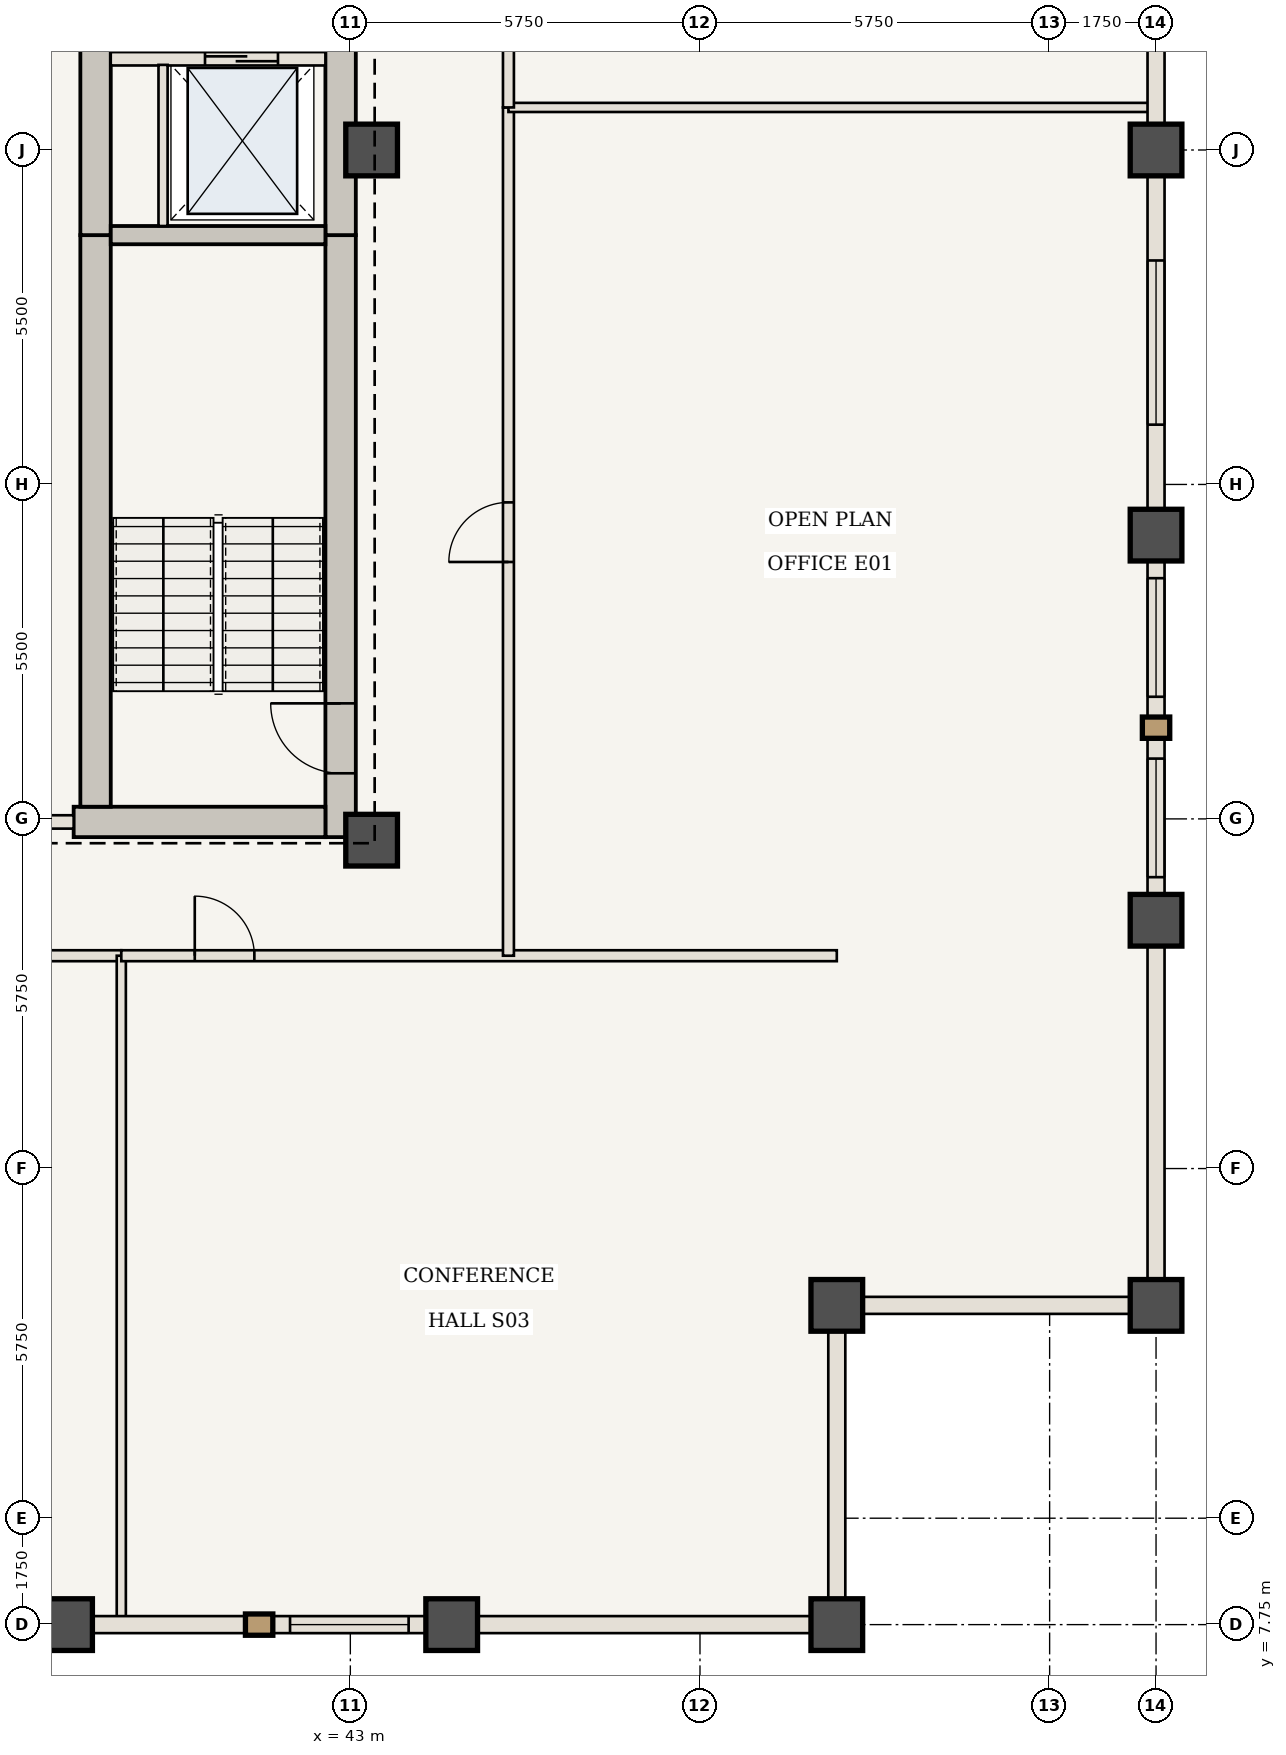
"""IFC4 building model, lengths in metres.
Left out: names, types, materials, properties, quantities, classifications, styles, units other than length and angle.
Written with IfcOpenShell. Run it as: python <this file> out.ifc"""

import sys

from ifc_helpers import new_model, si_unit, direction, frame, frame_2d, origin, origin_2d, place, context, subcontext, project, spatial, rectangle, extrude, element, fill, save


model = new_model("IFC4")
c1 = context("Model", 3, precision=1e-05, world=origin(), true_north=direction((0.0, 1.0)))
c2 = subcontext(c1, "Body", "Model", "MODEL_VIEW")
j1 = project(units=[si_unit("LENGTHUNIT", "METRE"), si_unit("PLANEANGLEUNIT", "RADIAN")], contexts=[c1])
p1 = place(None, origin())
s1 = spatial("IfcSite", under=j1, at=p1, CompositionType="ELEMENT")
p2 = place(p1, origin())
s2 = spatial("IfcBuilding", under=s1, at=p2, CompositionType="ELEMENT")
p3 = place(p2, frame((0.0, 0.0, 233.1)))
s3 = spatial("IfcBuildingStorey", under=s2, at=p3, CompositionType="ELEMENT", Elevation=233.1)
p4 = place(p3, frame((42.84, 20.7, 0.0), z_axis=(0.0, 0.0, 1.0), x_axis=(0.0, 1.0, 0.0)))
e1 = element("IfcWall", 1, at=p4, inside=s3, PredefinedType="SHEAR", context=c2, shape_type="SweptSolid", body=[
    extrude(rectangle(XDim=9.9, YDim=0.5, at=frame_2d((4.95, 0.0))), origin(), (0.0, 0.0, 1.0), 3.85),
])
p5 = place(p4, frame((1.05, 0.0, 0.0)))
e2 = element("IfcOpeningElement", 2, at=p5, cuts=e1, PredefinedType="OPENING", context=c2, shape_type="SweptSolid", body=[
    extrude(rectangle(XDim=1.15, YDim=2.15, at=frame_2d((0.575, 1.075))), frame((0.0, 0.26, 0.0), z_axis=(0.0, -1.0, 0.0), x_axis=(1.0, 0.0, 0.0)), (0.0, 0.0, 1.0), 0.52),
])
p6 = place(p3, frame((42.84, 30.6, 0.0), z_axis=(0.0, 0.0, 1.0), x_axis=(0.0, 1.0, 0.0)))
e3 = element("IfcWall", 3, at=p6, inside=s3, PredefinedType="SHEAR", context=c2, shape_type="SweptSolid", body=[
    extrude(rectangle(XDim=12.65, YDim=0.5, at=frame_2d((6.325, 0.0))), origin(), (0.0, 0.0, 1.0), 3.85),
])
p7 = place(p6, frame((4.2, 0.0, 0.0)))
e4 = element("IfcOpeningElement", 4, at=p7, cuts=e3, PredefinedType="OPENING", context=c2, shape_type="SweptSolid", body=[
    extrude(rectangle(XDim=1.1, YDim=2.15, at=frame_2d((0.55, 1.075))), frame((0.0, 0.26, 0.0), z_axis=(0.0, -1.0, 0.0), x_axis=(1.0, 0.0, 0.0)), (0.0, 0.0, 1.0), 0.52),
])
p8 = place(p6, frame((8.4, 0.0, 0.0)))
e5 = element("IfcOpeningElement", 5, at=p8, cuts=e3, PredefinedType="OPENING", context=c2, shape_type="SweptSolid", body=[
    extrude(rectangle(XDim=0.88, YDim=2.1, at=frame_2d((0.44, 1.05))), frame((0.0, 0.26, 0.0), z_axis=(0.0, -1.0, 0.0), x_axis=(1.0, 0.0, 0.0)), (0.0, 0.0, 1.0), 0.52),
])
p9 = place(p6, frame((10.5, 0.0, 0.0)))
e6 = element("IfcOpeningElement", 6, at=p9, cuts=e3, PredefinedType="OPENING", context=c2, shape_type="SweptSolid", body=[
    extrude(rectangle(XDim=0.88, YDim=2.1, at=frame_2d((0.44, 1.05))), frame((0.0, 0.26, 0.0), z_axis=(0.0, -1.0, 0.0), x_axis=(1.0, 0.0, 0.0)), (0.0, 0.0, 1.0), 0.52),
])
p10 = place(p3, frame((38.45, 20.95, 0.0), z_axis=(0.0, 0.0, 1.0), x_axis=(1.0, 0.0, 0.0)))
e7 = element("IfcWall", 7, at=p10, inside=s3, PredefinedType="SHEAR", context=c2, shape_type="SweptSolid", body=[
    extrude(rectangle(XDim=4.14, YDim=0.5, at=frame_2d((2.07, 0.0))), origin(), (0.0, 0.0, 1.0), 3.85),
])
p11 = place(p3, frame((38.81, 21.2, 0.0), z_axis=(0.0, 0.0, 1.0), x_axis=(0.0, 1.0, 0.0)))
e8 = element("IfcWall", 8, at=p11, inside=s3, PredefinedType="SHEAR", context=c2, shape_type="SweptSolid", body=[
    extrude(rectangle(XDim=9.4, YDim=0.5, at=frame_2d((4.7, 0.0))), origin(), (0.0, 0.0, 1.0), 3.85),
])
p12 = place(p3, frame((38.81, 30.6, 0.0), z_axis=(0.0, 0.0, 1.0), x_axis=(0.0, 1.0, 0.0)))
e9 = element("IfcWall", 9, at=p12, inside=s3, PredefinedType="SHEAR", context=c2, shape_type="SweptSolid", body=[
    extrude(rectangle(XDim=12.15, YDim=0.5, at=frame_2d((6.075, 0.0))), origin(), (0.0, 0.0, 1.0), 3.85),
])
for number, where, z_axis, x_axis in (
    (10, (43.35, 20.65, 0.0), (0.0, 0.0, 1.0), (1.0, 0.0, 0.0)),
    (11, (43.35, 32.0, 0.0), (0.0, 0.0, 1.0), (1.0, 0.0, 0.0)),
    (12, (51.0, 7.75, 0.0), (0.0, 0.0, 1.0), (1.0, 0.0, 0.0)),
    (13, (51.0, 13.0, 0.0), (0.0, 0.0, 1.0), (1.0, 0.0, 0.0)),
    (14, (56.25, 13.0, 0.0), (0.0, 0.0, 1.0), (1.0, 0.0, 0.0)),
    (15, (56.25, 19.333, 0.0), (0.0, 0.0, 1.0), (1.0, 0.0, 0.0)),
    (16, (56.25, 25.667, 0.0), (0.0, 0.0, 1.0), (1.0, 0.0, 0.0)),
    (17, (56.25, 32.0, 0.0), (0.0, 0.0, 1.0), (1.0, 0.0, 0.0)),
    (18, (38.333, 7.75, 0.0), (0.0, 0.0, 1.0), (1.0, 0.0, 0.0)),
    (19, (44.667, 7.75, 0.0), (0.0, 0.0, 1.0), (1.0, 0.0, 0.0)),
):
    element("IfcColumn", number, at=place(p3, frame(where, z_axis=z_axis, x_axis=x_axis)), inside=s3, PredefinedType="COLUMN", context=c2, shape_type="SweptSolid", body=[
        extrude(rectangle(XDim=0.85, YDim=0.85, at=origin_2d()), origin(), (0.0, 0.0, 1.0), 3.85),
    ])
p13 = place(p3, frame((39.06, 30.6, 0.0), z_axis=(0.0, 0.0, 1.0), x_axis=(1.0, 0.0, 0.0)))
e20 = element("IfcWall", 20, at=p13, inside=s3, PredefinedType="SHEAR", context=c2, shape_type="SweptSolid", body=[
    extrude(rectangle(XDim=3.53, YDim=0.3, at=frame_2d((1.765, 0.0))), origin(), (0.0, 0.0, 1.0), 3.685),
])
p14 = place(p3, frame((39.06, 33.5, 0.0), z_axis=(0.0, 0.0, 1.0), x_axis=(1.0, 0.0, 0.0)))
e21 = element("IfcWall", 21, at=p14, inside=s3, PredefinedType="STANDARD", context=c2, shape_type="SweptSolid", body=[
    extrude(rectangle(XDim=3.53, YDim=0.22, at=frame_2d((1.765, 0.0))), origin(), (0.0, 0.0, 1.0), 3.685),
])
p15 = place(p14, frame((1.55, 0.0, 0.0)))
e22 = element("IfcOpeningElement", 22, at=p15, cuts=e21, PredefinedType="OPENING", context=c2, shape_type="SweptSolid", body=[
    extrude(rectangle(XDim=1.2, YDim=2.2, at=frame_2d((0.6, 1.1))), frame((0.0, 0.12, 0.0), z_axis=(0.0, -1.0, 0.0), x_axis=(1.0, 0.0, 0.0)), (0.0, 0.0, 1.0), 0.24),
])
p16 = place(p3, frame((39.92, 30.75, 0.0), z_axis=(0.0, 0.0, 1.0), x_axis=(0.0, 1.0, 0.0)))
e23 = element("IfcWall", 23, at=p16, inside=s3, PredefinedType="STANDARD", context=c2, shape_type="SweptSolid", body=[
    extrude(rectangle(XDim=2.65, YDim=0.15, at=frame_2d((1.325, 0.0))), origin(), (0.0, 0.0, 1.0), 3.685),
])
p17 = place(p3, frame((35.15, 20.95, 0.0), z_axis=(0.0, 0.0, 1.0), x_axis=(1.0, 0.0, 0.0)))
e24 = element("IfcWall", 24, at=p17, inside=s3, PredefinedType="STANDARD", context=c2, shape_type="SweptSolid", body=[
    extrude(rectangle(XDim=3.3, YDim=0.22, at=frame_2d((1.65, 0.0))), origin(), (0.0, 0.0, 1.0), 3.685),
])
p18 = place(p17, frame((1.1, 0.0, 0.0)))
e25 = element("IfcOpeningElement", 25, at=p18, cuts=e24, PredefinedType="OPENING", context=c2, shape_type="SweptSolid", body=[
    extrude(rectangle(XDim=1.1, YDim=2.15, at=frame_2d((0.55, 1.075))), frame((0.0, 0.12, 0.0), z_axis=(0.0, -1.0, 0.0), x_axis=(1.0, 0.0, 0.0)), (0.0, 0.0, 1.0), 0.24),
])
p19 = place(p3, frame((24.867, 18.75, 0.0), z_axis=(0.0, 0.0, 1.0), x_axis=(1.0, 0.0, 0.0)))
e26 = element("IfcWall", 26, at=p19, inside=s3, PredefinedType="STANDARD", context=c2, shape_type="SweptSolid", body=[
    extrude(rectangle(XDim=14.367, YDim=0.18, at=frame_2d((7.183, 0.0))), origin(), (0.0, 0.0, 1.0), 3.685),
])
p20 = place(p19, frame((8.133, 0.0, 0.0)))
e27 = element("IfcOpeningElement", 27, at=p20, cuts=e26, PredefinedType="OPENING", context=c2, shape_type="SweptSolid", body=[
    extrude(rectangle(XDim=0.98, YDim=2.2, at=frame_2d((0.49, 1.1))), frame((0.0, 0.1, 0.0), z_axis=(0.0, -1.0, 0.0), x_axis=(1.0, 0.0, 0.0)), (0.0, 0.0, 1.0), 0.2),
])
p21 = place(p3, frame((39.233, 7.81, 0.0), z_axis=(0.0, 0.0, 1.0), x_axis=(0.0, 1.0, 0.0)))
e28 = element("IfcWall", 28, at=p21, inside=s3, PredefinedType="STANDARD", context=c2, shape_type="SweptSolid", body=[
    extrude(rectangle(XDim=10.94, YDim=0.15, at=frame_2d((5.47, 0.0))), origin(), (0.0, 0.0, 1.0), 3.685),
])
p22 = place(p3, frame((39.233, 18.75, 0.0), z_axis=(0.0, 0.0, 1.0), x_axis=(1.0, 0.0, 0.0)))
e29 = element("IfcWall", 29, at=p22, inside=s3, PredefinedType="STANDARD", context=c2, shape_type="SweptSolid", body=[
    extrude(rectangle(XDim=11.767, YDim=0.18, at=frame_2d((5.883, 0.0))), origin(), (0.0, 0.0, 1.0), 3.685),
])
p23 = place(p22, frame((1.208, 0.0, 0.0)))
e30 = element("IfcOpeningElement", 30, at=p23, cuts=e29, PredefinedType="OPENING", context=c2, shape_type="SweptSolid", body=[
    extrude(rectangle(XDim=0.98, YDim=2.2, at=frame_2d((0.49, 1.1))), frame((0.0, 0.1, 0.0), z_axis=(0.0, -1.0, 0.0), x_axis=(1.0, 0.0, 0.0)), (0.0, 0.0, 1.0), 0.2),
])
p24 = place(p3, frame((45.6, 18.75, 0.0), z_axis=(0.0, 0.0, 1.0), x_axis=(0.0, 1.0, 0.0)))
e31 = element("IfcWall", 31, at=p24, inside=s3, PredefinedType="STANDARD", context=c2, shape_type="SweptSolid", body=[
    extrude(rectangle(XDim=13.95, YDim=0.18, at=frame_2d((6.975, 0.0))), origin(), (0.0, 0.0, 1.0), 3.685),
])
p25 = place(p24, frame((6.475, 0.0, 0.0)))
e32 = element("IfcOpeningElement", 32, at=p25, cuts=e31, PredefinedType="OPENING", context=c2, shape_type="SweptSolid", body=[
    extrude(rectangle(XDim=0.98, YDim=2.2, at=frame_2d((0.49, 1.1))), frame((0.0, 0.1, 0.0), z_axis=(0.0, -1.0, 0.0), x_axis=(1.0, 0.0, 0.0)), (0.0, 0.0, 1.0), 0.2),
])
p26 = place(p3, frame((45.6, 32.7, 0.0), z_axis=(0.0, 0.0, 1.0), x_axis=(1.0, 0.0, 0.0)))
e33 = element("IfcWall", 33, at=p26, inside=s3, PredefinedType="STANDARD", context=c2, shape_type="SweptSolid", body=[
    extrude(rectangle(XDim=10.59, YDim=0.15, at=frame_2d((5.295, 0.0))), origin(), (0.0, 0.0, 1.0), 3.685),
])
p27 = place(p3, frame((45.6, 32.7, 0.0), z_axis=(0.0, 0.0, 1.0), x_axis=(0.0, 1.0, 0.0)))
e34 = element("IfcWall", 34, at=p27, inside=s3, PredefinedType="STANDARD", context=c2, shape_type="SweptSolid", body=[
    extrude(rectangle(XDim=12.55, YDim=0.18, at=frame_2d((6.275, 0.0))), origin(), (0.0, 0.0, 1.0), 3.685),
])
p28 = place(p27, frame((5.775, 0.0, 0.0)))
e35 = element("IfcOpeningElement", 35, at=p28, cuts=e34, PredefinedType="OPENING", context=c2, shape_type="SweptSolid", body=[
    extrude(rectangle(XDim=0.98, YDim=2.2, at=frame_2d((0.49, 1.1))), frame((0.0, 0.1, 0.0), z_axis=(0.0, -1.0, 0.0), x_axis=(1.0, 0.0, 0.0)), (0.0, 0.0, 1.0), 0.2),
])
p29 = place(p3, frame((38.333, 7.75, 0.0), z_axis=(0.0, 0.0, 1.0), x_axis=(-1.0, 0.0, 0.0)))
e36 = element("IfcWall", 36, at=p29, inside=s3, PredefinedType="USERDEFINED", context=c2, shape_type="SweptSolid", body=[
    extrude(rectangle(XDim=6.333, YDim=0.28, at=frame_2d((3.167, 0.0))), origin(), (0.0, 0.0, 1.0), 2.985),
])
p30 = place(p29, frame((1.817, 0.0, 0.85)))
e37 = element("IfcOpeningElement", 37, at=p30, cuts=e36, PredefinedType="OPENING", context=c2, shape_type="SweptSolid", body=[
    extrude(rectangle(XDim=2.7, YDim=1.935, at=frame_2d((1.35, 0.968))), frame((0.0, 0.15, 0.0), z_axis=(0.0, -1.0, 0.0), x_axis=(1.0, 0.0, 0.0)), (0.0, 0.0, 1.0), 0.3),
])
p31 = place(p3, frame((44.667, 7.75, 0.0), z_axis=(0.0, 0.0, 1.0), x_axis=(-1.0, 0.0, 0.0)))
e38 = element("IfcWall", 38, at=p31, inside=s3, PredefinedType="USERDEFINED", context=c2, shape_type="SweptSolid", body=[
    extrude(rectangle(XDim=6.333, YDim=0.28, at=frame_2d((3.167, 0.0))), origin(), (0.0, 0.0, 1.0), 2.985),
])
p32 = place(p31, frame((0.708, 0.0, 0.85)))
e39 = element("IfcOpeningElement", 39, at=p32, cuts=e38, PredefinedType="OPENING", context=c2, shape_type="SweptSolid", body=[
    extrude(rectangle(XDim=1.95, YDim=1.935, at=frame_2d((0.975, 0.968))), frame((0.0, 0.15, 0.0), z_axis=(0.0, -1.0, 0.0), x_axis=(1.0, 0.0, 0.0)), (0.0, 0.0, 1.0), 0.3),
])
for number, where, z_axis, x_axis in (
    (40, (51.0, 7.75, 0.0), (0.0, 0.0, 1.0), (-1.0, 0.0, 0.0)),
    (41, (56.25, 19.333, 0.0), (0.0, 0.0, 1.0), (0.0, -1.0, 0.0)),
):
    element("IfcWall", number, at=place(p3, frame(where, z_axis=z_axis, x_axis=x_axis)), inside=s3, PredefinedType="USERDEFINED", context=c2, shape_type="SweptSolid", body=[
        extrude(rectangle(XDim=6.333, YDim=0.28, at=frame_2d((3.167, 0.0))), origin(), (0.0, 0.0, 1.0), 2.985),
    ])
p33 = place(p3, frame((56.25, 25.667, 0.0), z_axis=(0.0, 0.0, 1.0), x_axis=(0.0, -1.0, 0.0)))
e42 = element("IfcWall", 42, at=p33, inside=s3, PredefinedType="USERDEFINED", context=c2, shape_type="SweptSolid", body=[
    extrude(rectangle(XDim=6.333, YDim=0.28, at=frame_2d((3.167, 0.0))), origin(), (0.0, 0.0, 1.0), 2.985),
])
p34 = place(p33, frame((0.708, 0.0, 0.85)))
e43 = element("IfcOpeningElement", 43, at=p34, cuts=e42, PredefinedType="OPENING", context=c2, shape_type="SweptSolid", body=[
    extrude(rectangle(XDim=1.95, YDim=1.935, at=frame_2d((0.975, 0.968))), frame((0.0, 0.15, 0.0), z_axis=(0.0, -1.0, 0.0), x_axis=(1.0, 0.0, 0.0)), (0.0, 0.0, 1.0), 0.3),
])
p35 = place(p33, frame((3.675, 0.0, 0.85)))
e44 = element("IfcOpeningElement", 44, at=p35, cuts=e42, PredefinedType="OPENING", context=c2, shape_type="SweptSolid", body=[
    extrude(rectangle(XDim=1.95, YDim=1.935, at=frame_2d((0.975, 0.968))), frame((0.0, 0.15, 0.0), z_axis=(0.0, -1.0, 0.0), x_axis=(1.0, 0.0, 0.0)), (0.0, 0.0, 1.0), 0.3),
])
p36 = place(p3, frame((56.25, 32.0, 0.0), z_axis=(0.0, 0.0, 1.0), x_axis=(0.0, -1.0, 0.0)))
e45 = element("IfcWall", 45, at=p36, inside=s3, PredefinedType="USERDEFINED", context=c2, shape_type="SweptSolid", body=[
    extrude(rectangle(XDim=6.333, YDim=0.28, at=frame_2d((3.167, 0.0))), origin(), (0.0, 0.0, 1.0), 2.985),
])
p37 = place(p36, frame((1.817, 0.0, 0.85)))
e46 = element("IfcOpeningElement", 46, at=p37, cuts=e45, PredefinedType="OPENING", context=c2, shape_type="SweptSolid", body=[
    extrude(rectangle(XDim=2.7, YDim=1.935, at=frame_2d((1.35, 0.968))), frame((0.0, 0.15, 0.0), z_axis=(0.0, -1.0, 0.0), x_axis=(1.0, 0.0, 0.0)), (0.0, 0.0, 1.0), 0.3),
])
p38 = place(p3, frame((56.25, 38.333, 0.0), z_axis=(0.0, 0.0, 1.0), x_axis=(0.0, -1.0, 0.0)))
e47 = element("IfcWall", 47, at=p38, inside=s3, PredefinedType="USERDEFINED", context=c2, shape_type="SweptSolid", body=[
    extrude(rectangle(XDim=6.333, YDim=0.28, at=frame_2d((3.167, 0.0))), origin(), (0.0, 0.0, 1.0), 2.985),
])
p39 = place(p38, frame((1.629, 0.0, 0.85)))
e48 = element("IfcOpeningElement", 48, at=p39, cuts=e47, PredefinedType="OPENING", context=c2, shape_type="SweptSolid", body=[
    extrude(rectangle(XDim=2.7, YDim=1.935, at=frame_2d((1.35, 0.968))), frame((0.0, 0.15, 0.0), z_axis=(0.0, -1.0, 0.0), x_axis=(1.0, 0.0, 0.0)), (0.0, 0.0, 1.0), 0.3),
])
for number, where, z_axis, x_axis in (
    (49, (51.0, 13.0, 0.0), (0.0, 0.0, 1.0), (0.0, -1.0, 0.0)),
    (50, (56.25, 13.0, 0.0), (0.0, 0.0, 1.0), (-1.0, 0.0, 0.0)),
):
    element("IfcWall", number, at=place(p3, frame(where, z_axis=z_axis, x_axis=x_axis)), inside=s3, PredefinedType="USERDEFINED", context=c2, shape_type="SweptSolid", body=[
        extrude(rectangle(XDim=5.25, YDim=0.28, at=frame_2d((2.625, 0.0))), origin(), (0.0, 0.0, 1.0), 2.985),
    ])
p40 = place(p5, origin())
e51 = element("IfcDoor", 51, at=p40, inside=s3, OperationType="SINGLE_SWING_RIGHT", PredefinedType="DOOR", context=c2, shape_type="SweptSolid", body=[
    extrude(rectangle(XDim=1.15, YDim=2.15, at=frame_2d((0.575, 1.075))), frame((0.0, 0.025, 0.0), z_axis=(0.0, -1.0, 0.0), x_axis=(1.0, 0.0, 0.0)), (0.0, 0.0, 1.0), 0.05),
])
fill(e2, e51)
p41 = place(p15, origin())
e52 = element("IfcDoor", 52, at=p41, inside=s3, OperationType="DOUBLE_DOOR_SLIDING", PredefinedType="DOOR", context=c2, shape_type="SweptSolid", body=[
    extrude(rectangle(XDim=1.2, YDim=2.2, at=frame_2d((0.6, 1.1))), frame((0.0, 0.025, 0.0), z_axis=(0.0, -1.0, 0.0), x_axis=(1.0, 0.0, 0.0)), (0.0, 0.0, 1.0), 0.05),
])
fill(e22, e52)
p42 = place(p23, origin())
e53 = element("IfcDoor", 53, at=p42, inside=s3, OperationType="SINGLE_SWING_LEFT", PredefinedType="DOOR", context=c2, shape_type="SweptSolid", body=[
    extrude(rectangle(XDim=0.98, YDim=2.2, at=frame_2d((0.49, 1.1))), frame((0.0, 0.025, 0.0), z_axis=(0.0, -1.0, 0.0), x_axis=(1.0, 0.0, 0.0)), (0.0, 0.0, 1.0), 0.05),
])
fill(e30, e53)
p43 = place(p25, origin())
e54 = element("IfcDoor", 54, at=p43, inside=s3, OperationType="SINGLE_SWING_LEFT", PredefinedType="DOOR", context=c2, shape_type="SweptSolid", body=[
    extrude(rectangle(XDim=0.98, YDim=2.2, at=frame_2d((0.49, 1.1))), frame((0.0, 0.025, 0.0), z_axis=(0.0, -1.0, 0.0), x_axis=(1.0, 0.0, 0.0)), (0.0, 0.0, 1.0), 0.05),
])
fill(e32, e54)
p44 = place(p32, origin())
e55 = element("IfcWindow", 55, at=p44, inside=s3, PartitioningType="SINGLE_PANEL", PredefinedType="WINDOW", context=c2, shape_type="SweptSolid", body=[
    extrude(rectangle(XDim=1.95, YDim=1.935, at=frame_2d((0.975, 0.968))), frame((0.0, 0.03, 0.0), z_axis=(0.0, -1.0, 0.0), x_axis=(1.0, 0.0, 0.0)), (0.0, 0.0, 1.0), 0.06),
])
fill(e39, e55)
p45 = place(p34, origin())
e56 = element("IfcWindow", 56, at=p45, inside=s3, PartitioningType="SINGLE_PANEL", PredefinedType="WINDOW", context=c2, shape_type="SweptSolid", body=[
    extrude(rectangle(XDim=1.95, YDim=1.935, at=frame_2d((0.975, 0.968))), frame((0.0, 0.03, 0.0), z_axis=(0.0, -1.0, 0.0), x_axis=(1.0, 0.0, 0.0)), (0.0, 0.0, 1.0), 0.06),
])
fill(e43, e56)
p46 = place(p35, origin())
e57 = element("IfcWindow", 57, at=p46, inside=s3, PartitioningType="SINGLE_PANEL", PredefinedType="WINDOW", context=c2, shape_type="SweptSolid", body=[
    extrude(rectangle(XDim=1.95, YDim=1.935, at=frame_2d((0.975, 0.968))), frame((0.0, 0.03, 0.0), z_axis=(0.0, -1.0, 0.0), x_axis=(1.0, 0.0, 0.0)), (0.0, 0.0, 1.0), 0.06),
])
fill(e44, e57)
p47 = place(p37, origin())
e58 = element("IfcWindow", 58, at=p47, inside=s3, PartitioningType="SINGLE_PANEL", PredefinedType="WINDOW", context=c2, shape_type="SweptSolid", body=[
    extrude(rectangle(XDim=2.7, YDim=1.935, at=frame_2d((1.35, 0.968))), frame((0.0, 0.03, 0.0), z_axis=(0.0, -1.0, 0.0), x_axis=(1.0, 0.0, 0.0)), (0.0, 0.0, 1.0), 0.06),
])
fill(e46, e58)
save(model, sys.argv[1])
